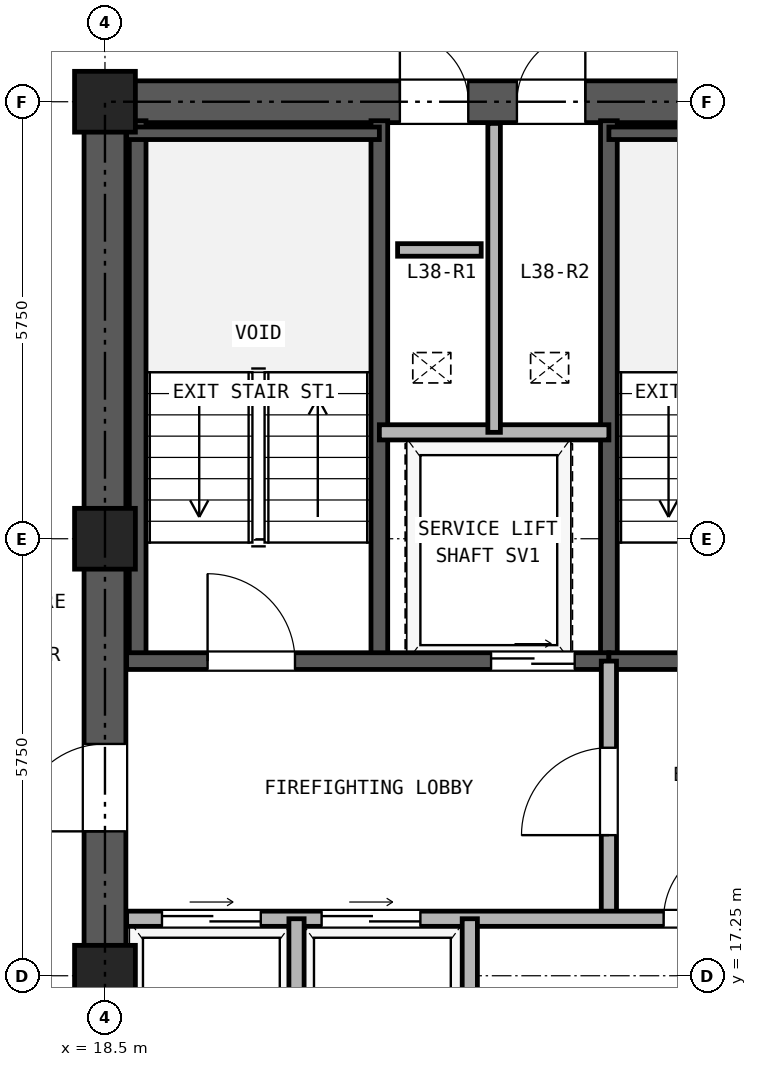
"""IFC4 building model, lengths in metres.
Left out: names, types, materials, properties, quantities, classifications, styles, units other than length and angle.
Written with IfcOpenShell. Run it as: python <this file> out.ifc"""

import sys

from ifc_helpers import new_model, si_unit, direction, frame, frame_2d, origin, origin_2d, place, context, subcontext, project, spatial, rectangle, hollow_rectangle, extrude, source, transform, mapped, element, fill, save


model = new_model("IFC4")
c1 = context("Model", 3, precision=1e-05, world=origin(), true_north=direction((0.0, 1.0)))
c2 = subcontext(c1, "Body", "Model", "MODEL_VIEW")
j1 = project(units=[si_unit("LENGTHUNIT", "METRE"), si_unit("PLANEANGLEUNIT", "RADIAN")], contexts=[c1])
p1 = place(None, origin())
s1 = spatial("IfcSite", under=j1, at=p1, CompositionType="ELEMENT")
p2 = place(p1, origin())
s2 = spatial("IfcBuilding", under=s1, at=p2, CompositionType="ELEMENT")
p3 = place(p2, frame((0.0, 0.0, 137.5)))
s3 = spatial("IfcBuildingStorey", under=s2, at=p3, CompositionType="ELEMENT", Elevation=137.5)
m1 = source(origin(), c2, "Body", "SweptSolid", [
    extrude(hollow_rectangle(XDim=0.8, YDim=0.8, WallThickness=0.045, at=origin_2d()), origin(), (0.0, 0.0, 1.0), 2.95),
])
for number, where, z_axis, x_axis in (
    (1, (18.5, 17.25, 0.0), (0.0, 0.0, 1.0), (1.0, 0.0, 0.0)),
    (2, (18.5, 23.0, 0.0), (0.0, 0.0, 1.0), (1.0, 0.0, 0.0)),
    (3, (18.5, 28.75, 0.0), (0.0, 0.0, 1.0), (1.0, 0.0, 0.0)),
):
    element("IfcColumn", number, at=place(p3, frame(where, z_axis=z_axis, x_axis=x_axis)), inside=s3, PredefinedType="COLUMN", context=c2, shape_type="MappedRepresentation", body=[
        mapped(m1, transform((0.0, 0.0, 0.0), x_axis=(1.0, 0.0, 0.0), y_axis=(0.0, 1.0, 0.0), z_axis=(0.0, 0.0, 1.0), scale=1.0)),
    ])
p4 = place(p3, frame((18.225, 28.75, 0.0), z_axis=(0.0, 0.0, 1.0), x_axis=(1.0, 0.0, 0.0)))
e4 = element("IfcWall", 4, at=p4, inside=s3, PredefinedType="SHEAR", context=c2, shape_type="SweptSolid", body=[
    extrude(rectangle(XDim=10.55, YDim=0.55, at=frame_2d((5.275, 0.0))), origin(), (0.0, 0.0, 1.0), 2.95),
])
p5 = place(p4, frame((4.155, 0.0, 0.0)))
e5 = element("IfcOpeningElement", 5, at=p5, cuts=e4, PredefinedType="OPENING", context=c2, shape_type="SweptSolid", body=[
    extrude(rectangle(XDim=0.9, YDim=2.05, at=frame_2d((0.45, 1.025))), frame((0.0, 0.285, 0.0), z_axis=(0.0, -1.0, 0.0), x_axis=(1.0, 0.0, 0.0)), (0.0, 0.0, 1.0), 0.57),
])
p6 = place(p4, frame((5.695, 0.0, 0.0)))
e6 = element("IfcOpeningElement", 6, at=p6, cuts=e4, PredefinedType="OPENING", context=c2, shape_type="SweptSolid", body=[
    extrude(rectangle(XDim=0.9, YDim=2.05, at=frame_2d((0.45, 1.025))), frame((0.0, 0.285, 0.0), z_axis=(0.0, -1.0, 0.0), x_axis=(1.0, 0.0, 0.0)), (0.0, 0.0, 1.0), 0.57),
])
p7 = place(p3, frame((18.5, 11.775, 0.0), z_axis=(0.0, 0.0, 1.0), x_axis=(0.0, 1.0, 0.0)))
e7 = element("IfcWall", 7, at=p7, inside=s3, PredefinedType="SHEAR", context=c2, shape_type="SweptSolid", body=[
    extrude(rectangle(XDim=16.7, YDim=0.55, at=frame_2d((8.35, 0.0))), origin(), (0.0, 0.0, 1.0), 2.95),
])
p8 = place(p7, frame((7.375, 0.0, 0.0)))
e8 = element("IfcOpeningElement", 8, at=p8, cuts=e7, PredefinedType="OPENING", context=c2, shape_type="SweptSolid", body=[
    extrude(rectangle(XDim=1.15, YDim=2.2, at=frame_2d((0.575, 1.1))), frame((0.0, 0.285, 0.0), z_axis=(0.0, -1.0, 0.0), x_axis=(1.0, 0.0, 0.0)), (0.0, 0.0, 1.0), 0.57),
])
for number, where, z_axis, x_axis in (
    (9, (18.93, 21.39, 0.0), (0.0, 0.0, 1.0), (0.0, 1.0, 0.0)),
    (10, (22.11, 21.39, 0.0), (0.0, 0.0, 1.0), (0.0, 1.0, 0.0)),
    (11, (25.13, 21.39, 0.0), (0.0, 0.0, 1.0), (0.0, 1.0, 0.0)),
):
    element("IfcWall", number, at=place(p3, frame(where, z_axis=z_axis, x_axis=x_axis)), inside=s3, PredefinedType="SOLIDWALL", context=c2, shape_type="SweptSolid", body=[
        extrude(rectangle(XDim=7.11, YDim=0.22, at=frame_2d((3.555, 0.0))), origin(), (0.0, 0.0, 1.0), 2.95),
    ])
p9 = place(p3, frame((18.785, 28.335, 0.0), z_axis=(0.0, 0.0, 1.0), x_axis=(1.0, 0.0, 0.0)))
e12 = element("IfcWall", 12, at=p9, inside=s3, PredefinedType="PARTITIONING", context=c2, shape_type="SweptSolid", body=[
    extrude(rectangle(XDim=3.325, YDim=0.165, at=frame_2d((1.663, 0.0))), origin(), (0.0, 0.0, 1.0), 2.95),
])
p10 = place(p3, frame((25.13, 28.335, 0.0), z_axis=(0.0, 0.0, 1.0), x_axis=(1.0, 0.0, 0.0)))
e13 = element("IfcWall", 13, at=p10, inside=s3, PredefinedType="PARTITIONING", context=c2, shape_type="SweptSolid", body=[
    extrude(rectangle(XDim=3.085, YDim=0.165, at=frame_2d((1.542, 0.0))), origin(), (0.0, 0.0, 1.0), 2.95),
])
p11 = place(p3, frame((18.785, 21.39, 0.0), z_axis=(0.0, 0.0, 1.0), x_axis=(1.0, 0.0, 0.0)))
e14 = element("IfcWall", 14, at=p11, inside=s3, PredefinedType="SOLIDWALL", context=c2, shape_type="SweptSolid", body=[
    extrude(rectangle(XDim=6.345, YDim=0.22, at=frame_2d((3.172, 0.0))), origin(), (0.0, 0.0, 1.0), 2.95),
])
p12 = place(p11, frame((1.065, 0.0, 0.0)))
e15 = element("IfcOpeningElement", 15, at=p12, cuts=e14, PredefinedType="OPENING", context=c2, shape_type="SweptSolid", body=[
    extrude(rectangle(XDim=1.15, YDim=2.2, at=frame_2d((0.575, 1.1))), frame((0.0, 0.12, 0.0), z_axis=(0.0, -1.0, 0.0), x_axis=(1.0, 0.0, 0.0)), (0.0, 0.0, 1.0), 0.24),
])
p13 = place(p11, frame((4.795, 0.0, 0.0)))
e16 = element("IfcOpeningElement", 16, at=p13, cuts=e14, PredefinedType="OPENING", context=c2, shape_type="SweptSolid", body=[
    extrude(rectangle(XDim=1.1, YDim=2.25, at=frame_2d((0.55, 1.125))), frame((0.0, 0.12, 0.0), z_axis=(0.0, -1.0, 0.0), x_axis=(1.0, 0.0, 0.0)), (0.0, 0.0, 1.0), 0.24),
])
p14 = place(p3, frame((25.13, 21.39, 0.0), z_axis=(0.0, 0.0, 1.0), x_axis=(1.0, 0.0, 0.0)))
e17 = element("IfcWall", 17, at=p14, inside=s3, PredefinedType="SOLIDWALL", context=c2, shape_type="SweptSolid", body=[
    extrude(rectangle(XDim=3.085, YDim=0.22, at=frame_2d((1.542, 0.0))), origin(), (0.0, 0.0, 1.0), 2.95),
])
p15 = place(p14, frame((0.92, 0.0, 0.0)))
e18 = element("IfcOpeningElement", 18, at=p15, cuts=e17, PredefinedType="OPENING", context=c2, shape_type="SweptSolid", body=[
    extrude(rectangle(XDim=1.15, YDim=2.2, at=frame_2d((0.575, 1.1))), frame((0.0, 0.12, 0.0), z_axis=(0.0, -1.0, 0.0), x_axis=(1.0, 0.0, 0.0)), (0.0, 0.0, 1.0), 0.24),
])
p16 = place(p3, frame((22.11, 24.4, 0.0), z_axis=(0.0, 0.0, 1.0), x_axis=(1.0, 0.0, 0.0)))
e19 = element("IfcWall", 19, at=p16, inside=s3, PredefinedType="PARTITIONING", context=c2, shape_type="SweptSolid", body=[
    extrude(rectangle(XDim=3.02, YDim=0.2, at=frame_2d((1.51, 0.0))), origin(), (0.0, 0.0, 1.0), 2.95),
])
p17 = place(p3, frame((23.62, 24.4, 0.0), z_axis=(0.0, 0.0, 1.0), x_axis=(0.0, 1.0, 0.0)))
e20 = element("IfcWall", 20, at=p17, inside=s3, PredefinedType="PARTITIONING", context=c2, shape_type="SweptSolid", body=[
    extrude(rectangle(XDim=4.065, YDim=0.165, at=frame_2d((2.033, 0.0))), origin(), (0.0, 0.0, 1.0), 2.95),
])
p18 = place(p3, frame((25.13, 18.0, 0.0), z_axis=(0.0, 0.0, 1.0), x_axis=(0.0, 1.0, 0.0)))
e21 = element("IfcWall", 21, at=p18, inside=s3, PredefinedType="PARTITIONING", context=c2, shape_type="SweptSolid", body=[
    extrude(rectangle(XDim=3.39, YDim=0.2, at=frame_2d((1.695, 0.0))), origin(), (0.0, 0.0, 1.0), 2.95),
])
p19 = place(p18, frame((1.1, 0.0, 0.0)))
e22 = element("IfcOpeningElement", 22, at=p19, cuts=e21, PredefinedType="OPENING", context=c2, shape_type="SweptSolid", body=[
    extrude(rectangle(XDim=1.15, YDim=2.2, at=frame_2d((0.575, 1.1))), frame((0.0, 0.11, 0.0), z_axis=(0.0, -1.0, 0.0), x_axis=(1.0, 0.0, 0.0)), (0.0, 0.0, 1.0), 0.22),
])
p20 = place(p3, frame((18.785, 18.0, 0.0), z_axis=(0.0, 0.0, 1.0), x_axis=(1.0, 0.0, 0.0)))
e23 = element("IfcWall", 23, at=p20, inside=s3, PredefinedType="PARTITIONING", context=c2, shape_type="SweptSolid", body=[
    extrude(rectangle(XDim=9.43, YDim=0.2, at=frame_2d((4.715, 0.0))), origin(), (0.0, 0.0, 1.0), 2.95),
])
p21 = place(p20, frame((0.465, 0.0, 0.0)))
e24 = element("IfcOpeningElement", 24, at=p21, cuts=e23, PredefinedType="OPENING", context=c2, shape_type="SweptSolid", body=[
    extrude(rectangle(XDim=1.3, YDim=2.3, at=frame_2d((0.65, 1.15))), frame((0.0, 0.11, 0.0), z_axis=(0.0, -1.0, 0.0), x_axis=(1.0, 0.0, 0.0)), (0.0, 0.0, 1.0), 0.22),
])
p22 = place(p20, frame((2.565, 0.0, 0.0)))
e25 = element("IfcOpeningElement", 25, at=p22, cuts=e23, PredefinedType="OPENING", context=c2, shape_type="SweptSolid", body=[
    extrude(rectangle(XDim=1.3, YDim=2.3, at=frame_2d((0.65, 1.15))), frame((0.0, 0.11, 0.0), z_axis=(0.0, -1.0, 0.0), x_axis=(1.0, 0.0, 0.0)), (0.0, 0.0, 1.0), 0.22),
])
p23 = place(p20, frame((7.065, 0.0, 0.0)))
e26 = element("IfcOpeningElement", 26, at=p23, cuts=e23, PredefinedType="OPENING", context=c2, shape_type="SweptSolid", body=[
    extrude(rectangle(XDim=1.0, YDim=2.15, at=frame_2d((0.5, 1.075))), frame((0.0, 0.11, 0.0), z_axis=(0.0, -1.0, 0.0), x_axis=(1.0, 0.0, 0.0)), (0.0, 0.0, 1.0), 0.22),
])
for number, where, z_axis, x_axis in (
    (27, (21.02, 15.0, 0.0), (0.0, 0.0, 1.0), (0.0, 1.0, 0.0)),
    (28, (23.3, 15.0, 0.0), (0.0, 0.0, 1.0), (0.0, 1.0, 0.0)),
):
    element("IfcWall", number, at=place(p3, frame(where, z_axis=z_axis, x_axis=x_axis)), inside=s3, PredefinedType="PARTITIONING", context=c2, shape_type="SweptSolid", body=[
        extrude(rectangle(XDim=3.0, YDim=0.2, at=frame_2d((1.5, 0.0))), origin(), (0.0, 0.0, 1.0), 2.95),
    ])
p24 = place(p3, frame((22.35, 26.8, 0.0), z_axis=(0.0, 0.0, 1.0), x_axis=(1.0, 0.0, 0.0)))
e29 = element("IfcWall", 29, at=p24, inside=s3, PredefinedType="PARTITIONING", context=c2, shape_type="SweptSolid", body=[
    extrude(rectangle(XDim=1.1, YDim=0.165, at=frame_2d((0.55, 0.0))), origin(), (0.0, 0.0, 1.0), 2.95),
])
p25 = place(p12, frame((1.15, 0.0, 0.0), z_axis=(0.0, 0.0, 1.0), x_axis=(-1.0, 0.0, 0.0)))
e30 = element("IfcDoor", 30, at=p25, inside=s3, OperationType="SINGLE_SWING_LEFT", PredefinedType="DOOR", context=c2, shape_type="SweptSolid", body=[
    extrude(rectangle(XDim=1.15, YDim=2.2, at=frame_2d((0.575, 1.1))), frame((0.0, 0.025, 0.0), z_axis=(0.0, -1.0, 0.0), x_axis=(1.0, 0.0, 0.0)), (0.0, 0.0, 1.0), 0.05),
])
fill(e15, e30)
p26 = place(p13, frame((1.1, 0.0, 0.0), z_axis=(0.0, 0.0, 1.0), x_axis=(-1.0, 0.0, 0.0)))
e31 = element("IfcDoor", 31, at=p26, inside=s3, OperationType="DOUBLE_DOOR_SLIDING", PredefinedType="DOOR", context=c2, shape_type="SweptSolid", body=[
    extrude(rectangle(XDim=1.1, YDim=2.25, at=frame_2d((0.55, 1.125))), frame((0.0, 0.025, 0.0), z_axis=(0.0, -1.0, 0.0), x_axis=(1.0, 0.0, 0.0)), (0.0, 0.0, 1.0), 0.05),
])
fill(e16, e31)
p27 = place(p19, origin())
e32 = element("IfcDoor", 32, at=p27, inside=s3, OperationType="SINGLE_SWING_LEFT", PredefinedType="DOOR", context=c2, shape_type="SweptSolid", body=[
    extrude(rectangle(XDim=1.15, YDim=2.2, at=frame_2d((0.575, 1.1))), frame((0.0, 0.025, 0.0), z_axis=(0.0, -1.0, 0.0), x_axis=(1.0, 0.0, 0.0)), (0.0, 0.0, 1.0), 0.05),
])
fill(e22, e32)
p28 = place(p21, origin())
e33 = element("IfcDoor", 33, at=p28, inside=s3, OperationType="DOUBLE_DOOR_SLIDING", PredefinedType="DOOR", context=c2, shape_type="SweptSolid", body=[
    extrude(rectangle(XDim=1.3, YDim=2.3, at=frame_2d((0.65, 1.15))), frame((0.0, 0.025, 0.0), z_axis=(0.0, -1.0, 0.0), x_axis=(1.0, 0.0, 0.0)), (0.0, 0.0, 1.0), 0.05),
])
fill(e24, e33)
p29 = place(p22, origin())
e34 = element("IfcDoor", 34, at=p29, inside=s3, OperationType="DOUBLE_DOOR_SLIDING", PredefinedType="DOOR", context=c2, shape_type="SweptSolid", body=[
    extrude(rectangle(XDim=1.3, YDim=2.3, at=frame_2d((0.65, 1.15))), frame((0.0, 0.025, 0.0), z_axis=(0.0, -1.0, 0.0), x_axis=(1.0, 0.0, 0.0)), (0.0, 0.0, 1.0), 0.05),
])
fill(e25, e34)
p30 = place(p23, frame((1.0, 0.0, 0.0), z_axis=(0.0, 0.0, 1.0), x_axis=(-1.0, 0.0, 0.0)))
e35 = element("IfcDoor", 35, at=p30, inside=s3, OperationType="SINGLE_SWING_RIGHT", PredefinedType="DOOR", context=c2, shape_type="SweptSolid", body=[
    extrude(rectangle(XDim=1.0, YDim=2.15, at=frame_2d((0.5, 1.075))), frame((0.0, 0.025, 0.0), z_axis=(0.0, -1.0, 0.0), x_axis=(1.0, 0.0, 0.0)), (0.0, 0.0, 1.0), 0.05),
])
fill(e26, e35)
p31 = place(p8, frame((1.15, 0.0, 0.0), z_axis=(0.0, 0.0, 1.0), x_axis=(-1.0, 0.0, 0.0)))
e36 = element("IfcDoor", 36, at=p31, inside=s3, OperationType="SINGLE_SWING_LEFT", PredefinedType="DOOR", context=c2, shape_type="SweptSolid", body=[
    extrude(rectangle(XDim=1.15, YDim=2.2, at=frame_2d((0.575, 1.1))), frame((0.0, 0.025, 0.0), z_axis=(0.0, -1.0, 0.0), x_axis=(1.0, 0.0, 0.0)), (0.0, 0.0, 1.0), 0.05),
])
fill(e8, e36)
p32 = place(p5, origin())
e37 = element("IfcDoor", 37, at=p32, inside=s3, OperationType="SINGLE_SWING_LEFT", PredefinedType="DOOR", context=c2, shape_type="SweptSolid", body=[
    extrude(rectangle(XDim=0.9, YDim=2.05, at=frame_2d((0.45, 1.025))), frame((0.0, 0.025, 0.0), z_axis=(0.0, -1.0, 0.0), x_axis=(1.0, 0.0, 0.0)), (0.0, 0.0, 1.0), 0.05),
])
fill(e5, e37)
p33 = place(p6, origin())
e38 = element("IfcDoor", 38, at=p33, inside=s3, OperationType="SINGLE_SWING_RIGHT", PredefinedType="DOOR", context=c2, shape_type="SweptSolid", body=[
    extrude(rectangle(XDim=0.9, YDim=2.05, at=frame_2d((0.45, 1.025))), frame((0.0, 0.025, 0.0), z_axis=(0.0, -1.0, 0.0), x_axis=(1.0, 0.0, 0.0)), (0.0, 0.0, 1.0), 0.05),
])
fill(e6, e38)
save(model, sys.argv[1])
